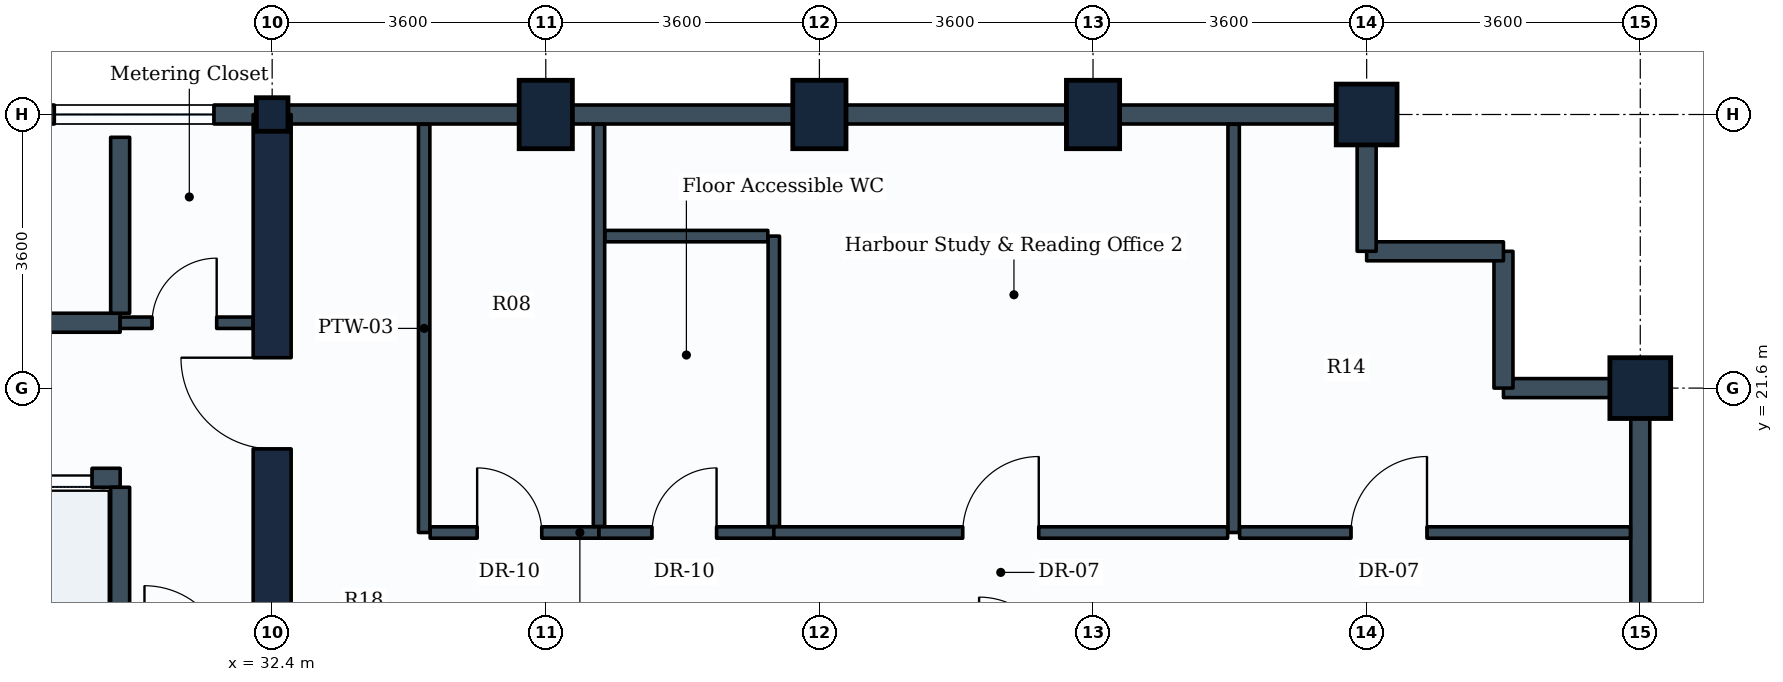
"""IFC4 building model, lengths in metres.
Left out: names, types, materials, properties, quantities, classifications, styles, units other than length and angle.
Written with IfcOpenShell. Run it as: python <this file> out.ifc"""

import sys

from ifc_helpers import new_model, si_unit, direction, frame, frame_2d, origin, origin_2d, place, context, subcontext, project, spatial, rectangle, i_section, extrude, element, fill, save


model = new_model("IFC4")
c1 = context("Model", 3, precision=1e-05, world=origin(), true_north=direction((0.0, 1.0)))
c2 = subcontext(c1, "Body", "Model", "MODEL_VIEW")
j1 = project(units=[si_unit("LENGTHUNIT", "METRE"), si_unit("PLANEANGLEUNIT", "RADIAN")], contexts=[c1])
p1 = place(None, origin())
s1 = spatial("IfcSite", under=j1, at=p1, CompositionType="ELEMENT")
p2 = place(p1, origin())
s2 = spatial("IfcBuilding", under=s1, at=p2, CompositionType="ELEMENT")
p3 = place(p2, frame((0.0, 0.0, 193.8)))
s3 = spatial("IfcBuildingStorey", under=s2, at=p3, CompositionType="ELEMENT", Elevation=193.8)
p4 = place(p3, frame((32.4, 25.2, 0.0), z_axis=(0.0, 0.0, 1.0), x_axis=(1.0, 0.0, 0.0)))
e1 = element("IfcColumn", 1, at=p4, inside=s3, PredefinedType="COLUMN", context=c2, shape_type="SweptSolid", body=[
    extrude(i_section(OverallWidth=0.416, OverallDepth=0.442, WebThickness=0.025, FlangeThickness=0.041, FilletRadius=0.015, at=origin_2d()), origin(), (0.0, 0.0, 1.0), 3.8),
])
for number, where, z_axis, x_axis in (
    (2, (36.0, 25.2, 0.0), (0.0, 0.0, 1.0), (1.0, 0.0, 0.0)),
    (3, (39.6, 25.2, 0.0), (0.0, 0.0, 1.0), (1.0, 0.0, 0.0)),
    (4, (43.2, 25.2, 0.0), (0.0, 0.0, 1.0), (1.0, 0.0, 0.0)),
):
    element("IfcColumn", number, at=place(p3, frame(where, z_axis=z_axis, x_axis=x_axis)), inside=s3, PredefinedType="COLUMN", context=c2, shape_type="SweptSolid", body=[
        extrude(rectangle(XDim=0.7, YDim=0.9, at=origin_2d()), origin(), (0.0, 0.0, 1.0), 3.8),
    ])
for number, where, z_axis, x_axis in (
    (5, (46.8, 25.2, 0.0), (0.0, 0.0, 1.0), (1.0, 0.0, 0.0)),
    (6, (50.4, 21.6, 0.0), (0.0, 0.0, 1.0), (0.0, 1.0, 0.0)),
):
    element("IfcColumn", number, at=place(p3, frame(where, z_axis=z_axis, x_axis=x_axis)), inside=s3, PredefinedType="COLUMN", context=c2, shape_type="SweptSolid", body=[
        extrude(rectangle(XDim=0.8, YDim=0.8, at=origin_2d()), origin(), (0.0, 0.0, 1.0), 3.8),
    ])
p5 = place(p3, frame((50.4, 21.6, 0.0), z_axis=(0.0, 0.0, 1.0), x_axis=(0.0, -1.0, 0.0)))
e7 = element("IfcWall", 7, at=p5, inside=s3, PredefinedType="STANDARD", context=c2, shape_type="SweptSolid", body=[
    extrude(rectangle(XDim=3.6, YDim=0.25, at=frame_2d((1.8, 0.0))), origin(), (0.0, 0.0, 1.0), 2.93),
])
p6 = place(p3, frame((48.6, 21.6, 0.0), z_axis=(0.0, 0.0, 1.0), x_axis=(1.0, 0.0, 0.0)))
e8 = element("IfcWall", 8, at=p6, inside=s3, PredefinedType="STANDARD", context=c2, shape_type="SweptSolid", body=[
    extrude(rectangle(XDim=1.8, YDim=0.25, at=frame_2d((0.9, 0.0))), origin(), (0.0, 0.0, 1.0), 2.93),
])
p7 = place(p3, frame((48.6, 23.4, 0.0), z_axis=(0.0, 0.0, 1.0), x_axis=(0.0, -1.0, 0.0)))
e9 = element("IfcWall", 9, at=p7, inside=s3, PredefinedType="STANDARD", context=c2, shape_type="SweptSolid", body=[
    extrude(rectangle(XDim=1.8, YDim=0.25, at=frame_2d((0.9, 0.0))), origin(), (0.0, 0.0, 1.0), 3.535),
])
p8 = place(p3, frame((46.8, 23.4, 0.0), z_axis=(0.0, 0.0, 1.0), x_axis=(1.0, 0.0, 0.0)))
e10 = element("IfcWall", 10, at=p8, inside=s3, PredefinedType="STANDARD", context=c2, shape_type="SweptSolid", body=[
    extrude(rectangle(XDim=1.8, YDim=0.25, at=frame_2d((0.9, 0.0))), origin(), (0.0, 0.0, 1.0), 3.535),
])
p9 = place(p3, frame((46.8, 25.2, 0.0), z_axis=(0.0, 0.0, 1.0), x_axis=(0.0, -1.0, 0.0)))
e11 = element("IfcWall", 11, at=p9, inside=s3, PredefinedType="STANDARD", context=c2, shape_type="SweptSolid", body=[
    extrude(rectangle(XDim=1.8, YDim=0.25, at=frame_2d((0.9, 0.0))), origin(), (0.0, 0.0, 1.0), 2.93),
])
p10 = place(p3, frame((43.2, 25.2, 0.0), z_axis=(0.0, 0.0, 1.0), x_axis=(1.0, 0.0, 0.0)))
e12 = element("IfcWall", 12, at=p10, inside=s3, PredefinedType="STANDARD", context=c2, shape_type="SweptSolid", body=[
    extrude(rectangle(XDim=3.6, YDim=0.25, at=frame_2d((1.8, 0.0))), origin(), (0.0, 0.0, 1.0), 2.93),
])
p11 = place(p3, frame((39.6, 25.2, 0.0), z_axis=(0.0, 0.0, 1.0), x_axis=(1.0, 0.0, 0.0)))
e13 = element("IfcWall", 13, at=p11, inside=s3, PredefinedType="STANDARD", context=c2, shape_type="SweptSolid", body=[
    extrude(rectangle(XDim=3.6, YDim=0.25, at=frame_2d((1.8, 0.0))), origin(), (0.0, 0.0, 1.0), 2.93),
])
for number, where, z_axis, x_axis in (
    (14, (36.0, 25.2, 0.0), (0.0, 0.0, 1.0), (1.0, 0.0, 0.0)),
    (15, (32.4, 25.2, 0.0), (0.0, 0.0, 1.0), (1.0, 0.0, 0.0)),
):
    element("IfcWall", number, at=place(p3, frame(where, z_axis=z_axis, x_axis=x_axis)), inside=s3, PredefinedType="STANDARD", context=c2, shape_type="SweptSolid", body=[
        extrude(rectangle(XDim=3.6, YDim=0.25, at=frame_2d((1.8, 0.0))), origin(), (0.0, 0.0, 1.0), 2.93),
    ])
p12 = place(p3, frame((28.8, 25.2, 0.0), z_axis=(0.0, 0.0, 1.0), x_axis=(1.0, 0.0, 0.0)))
e16 = element("IfcWall", 16, at=p12, inside=s3, PredefinedType="STANDARD", context=c2, shape_type="SweptSolid", body=[
    extrude(rectangle(XDim=3.6, YDim=0.25, at=frame_2d((1.8, 0.0))), origin(), (0.0, 0.0, 1.0), 2.93),
])
p13 = place(p12, frame((0.734, 0.0, 0.85)))
e17 = element("IfcOpeningElement", 17, at=p13, cuts=e16, PredefinedType="OPENING", context=c2, shape_type="SweptSolid", body=[
    extrude(rectangle(XDim=2.1, YDim=1.35, at=frame_2d((1.05, 0.675))), frame((0.0, 0.135, 0.0), z_axis=(0.0, -1.0, 0.0), x_axis=(1.0, 0.0, 0.0)), (0.0, 0.0, 1.0), 0.27),
])
p14 = place(p3, frame((32.4, 10.8, 0.0), z_axis=(0.0, 0.0, 1.0), x_axis=(0.0, 1.0, 0.0)))
e18 = element("IfcWall", 18, at=p14, inside=s3, PredefinedType="SHEAR", context=c2, shape_type="SweptSolid", body=[
    extrude(rectangle(XDim=14.4, YDim=0.5, at=frame_2d((7.2, 0.0))), origin(), (0.0, 0.0, 1.0), 3.55),
])
p15 = place(p14, frame((4.35, 0.0, 0.0)))
e19 = element("IfcOpeningElement", 19, at=p15, cuts=e18, PredefinedType="OPENING", context=c2, shape_type="SweptSolid", body=[
    extrude(rectangle(XDim=1.2, YDim=2.1, at=frame_2d((0.6, 1.05))), frame((0.0, 0.26, 0.0), z_axis=(0.0, -1.0, 0.0), x_axis=(1.0, 0.0, 0.0)), (0.0, 0.0, 1.0), 0.52),
])
p16 = place(p14, frame((10.0, 0.0, 0.0)))
e20 = element("IfcOpeningElement", 20, at=p16, cuts=e18, PredefinedType="OPENING", context=c2, shape_type="SweptSolid", body=[
    extrude(rectangle(XDim=1.2, YDim=2.1, at=frame_2d((0.6, 1.05))), frame((0.0, 0.26, 0.0), z_axis=(0.0, -1.0, 0.0), x_axis=(1.0, 0.0, 0.0)), (0.0, 0.0, 1.0), 0.52),
])
p17 = place(p3, frame((23.18, 20.42, 0.0), z_axis=(0.0, 0.0, 1.0), x_axis=(1.0, 0.0, 0.0)))
e21 = element("IfcWall", 21, at=p17, inside=s3, PredefinedType="PARTITIONING", context=c2, shape_type="SweptSolid", body=[
    extrude(rectangle(XDim=7.22, YDim=0.25, at=frame_2d((3.61, 0.0))), origin(), (0.0, 0.0, 1.0), 3.535),
])
p18 = place(p17, frame((0.41, 0.0, 0.0)))
e22 = element("IfcOpeningElement", 22, at=p18, cuts=e21, PredefinedType="OPENING", context=c2, shape_type="SweptSolid", body=[
    extrude(rectangle(XDim=1.1, YDim=2.1, at=frame_2d((0.55, 1.05))), frame((0.0, 0.135, 0.0), z_axis=(0.0, -1.0, 0.0), x_axis=(1.0, 0.0, 0.0)), (0.0, 0.0, 1.0), 0.27),
])
p19 = place(p17, frame((2.19, 0.0, 0.0)))
e23 = element("IfcOpeningElement", 23, at=p19, cuts=e21, PredefinedType="OPENING", context=c2, shape_type="SweptSolid", body=[
    extrude(rectangle(XDim=1.1, YDim=2.1, at=frame_2d((0.55, 1.05))), frame((0.0, 0.135, 0.0), z_axis=(0.0, -1.0, 0.0), x_axis=(1.0, 0.0, 0.0)), (0.0, 0.0, 1.0), 0.27),
])
p20 = place(p17, frame((3.97, 0.0, 0.0)))
e24 = element("IfcOpeningElement", 24, at=p20, cuts=e21, PredefinedType="OPENING", context=c2, shape_type="SweptSolid", body=[
    extrude(rectangle(XDim=1.1, YDim=2.1, at=frame_2d((0.55, 1.05))), frame((0.0, 0.135, 0.0), z_axis=(0.0, -1.0, 0.0), x_axis=(1.0, 0.0, 0.0)), (0.0, 0.0, 1.0), 0.27),
])
p21 = place(p17, frame((5.75, 0.0, 0.0)))
e25 = element("IfcOpeningElement", 25, at=p21, cuts=e21, PredefinedType="OPENING", context=c2, shape_type="SweptSolid", body=[
    extrude(rectangle(XDim=1.1, YDim=2.1, at=frame_2d((0.55, 1.05))), frame((0.0, 0.135, 0.0), z_axis=(0.0, -1.0, 0.0), x_axis=(1.0, 0.0, 0.0)), (0.0, 0.0, 1.0), 0.27),
])
p22 = place(p3, frame((30.4, 18.025, 0.0), z_axis=(0.0, 0.0, 1.0), x_axis=(0.0, 1.0, 0.0)))
e26 = element("IfcWall", 26, at=p22, inside=s3, PredefinedType="PARTITIONING", context=c2, shape_type="SweptSolid", body=[
    extrude(rectangle(XDim=2.27, YDim=0.25, at=frame_2d((1.135, 0.0))), origin(), (0.0, 0.0, 1.0), 3.535),
])
p23 = place(p3, frame((23.18, 22.46, 0.0), z_axis=(0.0, 0.0, 1.0), x_axis=(1.0, 0.0, 0.0)))
e27 = element("IfcWall", 27, at=p23, inside=s3, PredefinedType="PARTITIONING", context=c2, shape_type="SweptSolid", body=[
    extrude(rectangle(XDim=7.22, YDim=0.25, at=frame_2d((3.61, 0.0))), origin(), (0.0, 0.0, 1.0), 3.535),
])
p24 = place(p3, frame((30.4, 22.585, 0.0), z_axis=(0.0, 0.0, 1.0), x_axis=(0.0, 1.0, 0.0)))
e28 = element("IfcWall", 28, at=p24, inside=s3, PredefinedType="PARTITIONING", context=c2, shape_type="SweptSolid", body=[
    extrude(rectangle(XDim=2.315, YDim=0.25, at=frame_2d((1.157, 0.0))), origin(), (0.0, 0.0, 1.0), 3.535),
])
p25 = place(p3, frame((30.4, 22.46, 0.0), z_axis=(0.0, 0.0, 1.0), x_axis=(1.0, 0.0, 0.0)))
e29 = element("IfcWall", 29, at=p25, inside=s3, PredefinedType="PARTITIONING", context=c2, shape_type="SweptSolid", body=[
    extrude(rectangle(XDim=1.75, YDim=0.15, at=frame_2d((0.875, 0.0))), origin(), (0.0, 0.0, 1.0), 3.535),
])
p26 = place(p25, frame((0.42, 0.0, 0.0)))
e30 = element("IfcOpeningElement", 30, at=p26, cuts=e29, PredefinedType="OPENING", context=c2, shape_type="SweptSolid", body=[
    extrude(rectangle(XDim=0.85, YDim=2.1, at=frame_2d((0.425, 1.05))), frame((0.0, 0.085, 0.0), z_axis=(0.0, -1.0, 0.0), x_axis=(1.0, 0.0, 0.0)), (0.0, 0.0, 1.0), 0.17),
])
p27 = place(p3, frame((34.4, 19.7, 0.0), z_axis=(0.0, 0.0, 1.0), x_axis=(0.0, 1.0, 0.0)))
e31 = element("IfcWall", 31, at=p27, inside=s3, PredefinedType="PARTITIONING", context=c2, shape_type="SweptSolid", body=[
    extrude(rectangle(XDim=5.371, YDim=0.15, at=frame_2d((2.686, 0.0))), origin(), (0.0, 0.0, 1.0), 2.93),
])
p28 = place(p3, frame((34.479, 19.7, 0.0), z_axis=(0.0, 0.0, 1.0), x_axis=(1.0, 0.0, 0.0)))
e32 = element("IfcWall", 32, at=p28, inside=s3, PredefinedType="PARTITIONING", context=c2, shape_type="SweptSolid", body=[
    extrude(rectangle(XDim=2.221, YDim=0.15, at=frame_2d((1.11, 0.0))), origin(), (0.0, 0.0, 1.0), 3.22),
])
p29 = place(p28, frame((0.618, 0.0, 0.0)))
e33 = element("IfcOpeningElement", 33, at=p29, cuts=e32, PredefinedType="OPENING", context=c2, shape_type="SweptSolid", body=[
    extrude(rectangle(XDim=0.85, YDim=2.1, at=frame_2d((0.425, 1.05))), frame((0.0, 0.085, 0.0), z_axis=(0.0, -1.0, 0.0), x_axis=(1.0, 0.0, 0.0)), (0.0, 0.0, 1.0), 0.17),
])
p30 = place(p3, frame((36.7, 19.779, 0.0), z_axis=(0.0, 0.0, 1.0), x_axis=(0.0, 1.0, 0.0)))
e34 = element("IfcWall", 34, at=p30, inside=s3, PredefinedType="PARTITIONING", context=c2, shape_type="SweptSolid", body=[
    extrude(rectangle(XDim=5.292, YDim=0.15, at=frame_2d((2.646, 0.0))), origin(), (0.0, 0.0, 1.0), 2.93),
])
p31 = place(p3, frame((36.7, 19.7, 0.0), z_axis=(0.0, 0.0, 1.0), x_axis=(1.0, 0.0, 0.0)))
e35 = element("IfcWall", 35, at=p31, inside=s3, PredefinedType="PARTITIONING", context=c2, shape_type="SweptSolid", body=[
    extrude(rectangle(XDim=2.3, YDim=0.15, at=frame_2d((1.15, 0.0))), origin(), (0.0, 0.0, 1.0), 3.535),
])
p32 = place(p31, frame((0.697, 0.0, 0.0)))
e36 = element("IfcOpeningElement", 36, at=p32, cuts=e35, PredefinedType="OPENING", context=c2, shape_type="SweptSolid", body=[
    extrude(rectangle(XDim=0.85, YDim=2.1, at=frame_2d((0.425, 1.05))), frame((0.0, 0.085, 0.0), z_axis=(0.0, -1.0, 0.0), x_axis=(1.0, 0.0, 0.0)), (0.0, 0.0, 1.0), 0.17),
])
p33 = place(p3, frame((39.0, 19.779, 0.0), z_axis=(0.0, 0.0, 1.0), x_axis=(0.0, 1.0, 0.0)))
e37 = element("IfcWall", 37, at=p33, inside=s3, PredefinedType="PARTITIONING", context=c2, shape_type="SweptSolid", body=[
    extrude(rectangle(XDim=3.821, YDim=0.15, at=frame_2d((1.911, 0.0))), origin(), (0.0, 0.0, 1.0), 3.17),
])
p34 = place(p3, frame((36.779, 23.6, 0.0), z_axis=(0.0, 0.0, 1.0), x_axis=(1.0, 0.0, 0.0)))
e38 = element("IfcWall", 38, at=p34, inside=s3, PredefinedType="PARTITIONING", context=c2, shape_type="SweptSolid", body=[
    extrude(rectangle(XDim=2.142, YDim=0.15, at=frame_2d((1.071, 0.0))), origin(), (0.0, 0.0, 1.0), 3.535),
])
p35 = place(p3, frame((45.05, 19.7, 0.0), z_axis=(0.0, 0.0, 1.0), x_axis=(0.0, 1.0, 0.0)))
e39 = element("IfcWall", 39, at=p35, inside=s3, PredefinedType="PARTITIONING", context=c2, shape_type="SweptSolid", body=[
    extrude(rectangle(XDim=5.371, YDim=0.15, at=frame_2d((2.686, 0.0))), origin(), (0.0, 0.0, 1.0), 2.93),
])
p36 = place(p3, frame((39.0, 19.7, 0.0), z_axis=(0.0, 0.0, 1.0), x_axis=(1.0, 0.0, 0.0)))
e40 = element("IfcWall", 40, at=p36, inside=s3, PredefinedType="PARTITIONING", context=c2, shape_type="SweptSolid", body=[
    extrude(rectangle(XDim=5.971, YDim=0.15, at=frame_2d((2.985, 0.0))), origin(), (0.0, 0.0, 1.0), 3.17),
])
p37 = place(p36, frame((2.486, 0.0, 0.0)))
e41 = element("IfcOpeningElement", 41, at=p37, cuts=e40, PredefinedType="OPENING", context=c2, shape_type="SweptSolid", body=[
    extrude(rectangle(XDim=1.0, YDim=2.1, at=frame_2d((0.5, 1.05))), frame((0.0, 0.085, 0.0), z_axis=(0.0, -1.0, 0.0), x_axis=(1.0, 0.0, 0.0)), (0.0, 0.0, 1.0), 0.17),
])
p38 = place(p3, frame((45.129, 19.7, 0.0), z_axis=(0.0, 0.0, 1.0), x_axis=(1.0, 0.0, 0.0)))
e42 = element("IfcWall", 42, at=p38, inside=s3, PredefinedType="PARTITIONING", context=c2, shape_type="SweptSolid", body=[
    extrude(rectangle(XDim=5.142, YDim=0.15, at=frame_2d((2.571, 0.0))), origin(), (0.0, 0.0, 1.0), 2.93),
])
p39 = place(p38, frame((1.465, 0.0, 0.0)))
e43 = element("IfcOpeningElement", 43, at=p39, cuts=e42, PredefinedType="OPENING", context=c2, shape_type="SweptSolid", body=[
    extrude(rectangle(XDim=1.0, YDim=2.1, at=frame_2d((0.5, 1.05))), frame((0.0, 0.085, 0.0), z_axis=(0.0, -1.0, 0.0), x_axis=(1.0, 0.0, 0.0)), (0.0, 0.0, 1.0), 0.17),
])
p40 = place(p13, origin())
e44 = element("IfcWindow", 44, at=p40, inside=s3, PartitioningType="SINGLE_PANEL", PredefinedType="WINDOW", context=c2, shape_type="SweptSolid", body=[
    extrude(rectangle(XDim=2.1, YDim=1.35, at=frame_2d((1.05, 0.675))), frame((0.0, 0.03, 0.0), z_axis=(0.0, -1.0, 0.0), x_axis=(1.0, 0.0, 0.0)), (0.0, 0.0, 1.0), 0.06),
])
fill(e17, e44)
p41 = place(p21, origin())
e45 = element("IfcDoor", 45, at=p41, inside=s3, OperationType="SLIDING_TO_LEFT", PredefinedType="DOOR", context=c2, shape_type="SweptSolid", body=[
    extrude(rectangle(XDim=1.1, YDim=2.1, at=frame_2d((0.55, 1.05))), frame((0.0, 0.025, 0.0), z_axis=(0.0, -1.0, 0.0), x_axis=(1.0, 0.0, 0.0)), (0.0, 0.0, 1.0), 0.05),
])
fill(e25, e45)
p42 = place(p16, origin())
e46 = element("IfcDoor", 46, at=p42, inside=s3, OperationType="SINGLE_SWING_RIGHT", PredefinedType="DOOR", context=c2, shape_type="SweptSolid", body=[
    extrude(rectangle(XDim=1.2, YDim=2.1, at=frame_2d((0.6, 1.05))), frame((0.0, 0.025, 0.0), z_axis=(0.0, -1.0, 0.0), x_axis=(1.0, 0.0, 0.0)), (0.0, 0.0, 1.0), 0.05),
])
fill(e20, e46)
p43 = place(p26, origin())
e47 = element("IfcDoor", 47, at=p43, inside=s3, OperationType="SINGLE_SWING_RIGHT", PredefinedType="DOOR", context=c2, shape_type="SweptSolid", body=[
    extrude(rectangle(XDim=0.85, YDim=2.1, at=frame_2d((0.425, 1.05))), frame((0.0, 0.025, 0.0), z_axis=(0.0, -1.0, 0.0), x_axis=(1.0, 0.0, 0.0)), (0.0, 0.0, 1.0), 0.05),
])
fill(e30, e47)
p44 = place(p29, origin())
e48 = element("IfcDoor", 48, at=p44, inside=s3, OperationType="SINGLE_SWING_LEFT", PredefinedType="DOOR", context=c2, shape_type="SweptSolid", body=[
    extrude(rectangle(XDim=0.85, YDim=2.1, at=frame_2d((0.425, 1.05))), frame((0.0, 0.025, 0.0), z_axis=(0.0, -1.0, 0.0), x_axis=(1.0, 0.0, 0.0)), (0.0, 0.0, 1.0), 0.05),
])
fill(e33, e48)
p45 = place(p32, origin())
e49 = element("IfcDoor", 49, at=p45, inside=s3, OperationType="SINGLE_SWING_RIGHT", PredefinedType="DOOR", context=c2, shape_type="SweptSolid", body=[
    extrude(rectangle(XDim=0.85, YDim=2.1, at=frame_2d((0.425, 1.05))), frame((0.0, 0.025, 0.0), z_axis=(0.0, -1.0, 0.0), x_axis=(1.0, 0.0, 0.0)), (0.0, 0.0, 1.0), 0.05),
])
fill(e36, e49)
p46 = place(p37, origin())
e50 = element("IfcDoor", 50, at=p46, inside=s3, OperationType="SINGLE_SWING_RIGHT", PredefinedType="DOOR", context=c2, shape_type="SweptSolid", body=[
    extrude(rectangle(XDim=1.0, YDim=2.1, at=frame_2d((0.5, 1.05))), frame((0.0, 0.025, 0.0), z_axis=(0.0, -1.0, 0.0), x_axis=(1.0, 0.0, 0.0)), (0.0, 0.0, 1.0), 0.05),
])
fill(e41, e50)
p47 = place(p39, origin())
e51 = element("IfcDoor", 51, at=p47, inside=s3, OperationType="SINGLE_SWING_RIGHT", PredefinedType="DOOR", context=c2, shape_type="SweptSolid", body=[
    extrude(rectangle(XDim=1.0, YDim=2.1, at=frame_2d((0.5, 1.05))), frame((0.0, 0.025, 0.0), z_axis=(0.0, -1.0, 0.0), x_axis=(1.0, 0.0, 0.0)), (0.0, 0.0, 1.0), 0.05),
])
fill(e43, e51)
save(model, sys.argv[1])
